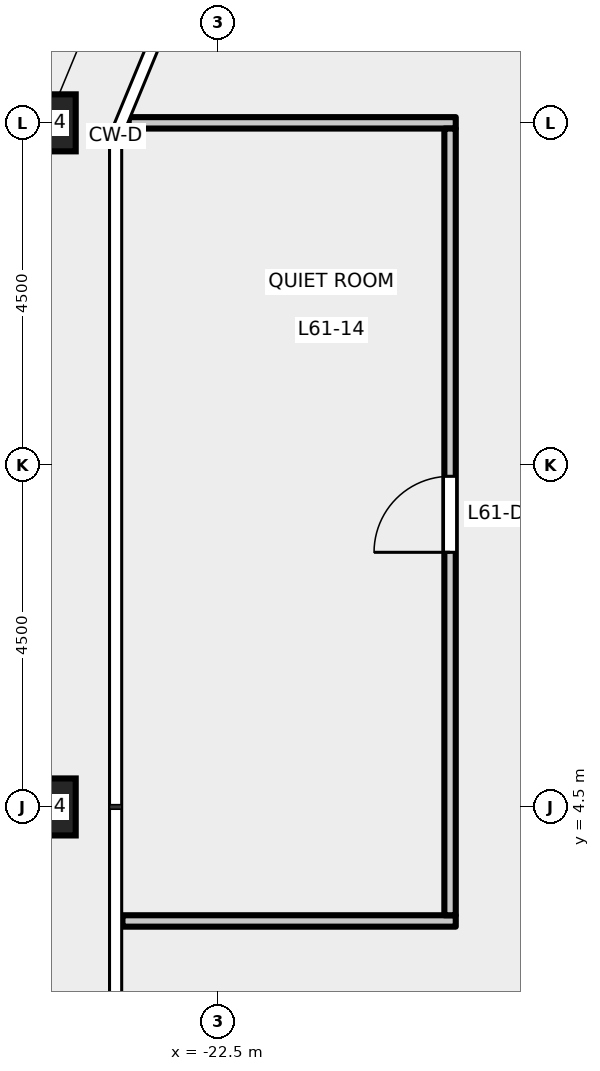
"""IFC4 building model, lengths in metres.
Left out: names, types, materials, properties, quantities, classifications, styles, units other than length and angle.
Written with IfcOpenShell. Run it as: python <this file> out.ifc"""

import sys

from ifc_helpers import new_model, si_unit, direction, frame, frame_2d, origin, origin_2d, place, context, subcontext, project, spatial, rectangle, hollow_rectangle, extrude, element, fill, save


model = new_model("IFC4")
c1 = context("Model", 3, precision=1e-05, world=origin(), true_north=direction((0.0, 1.0)))
c2 = subcontext(c1, "Body", "Model", "MODEL_VIEW")
j1 = project(units=[si_unit("LENGTHUNIT", "METRE"), si_unit("PLANEANGLEUNIT", "RADIAN")], contexts=[c1])
p1 = place(None, origin())
s1 = spatial("IfcSite", under=j1, at=p1, CompositionType="ELEMENT")
p2 = place(p1, origin())
s2 = spatial("IfcBuilding", under=s1, at=p2, CompositionType="ELEMENT")
p3 = place(p2, frame((0.0, 0.0, 284.2)))
s3 = spatial("IfcBuildingStorey", under=s2, at=p3, CompositionType="ELEMENT", Elevation=284.2)
for number, where, z_axis, x_axis in (
    (1, (-24.75, 13.5, -0.2), (0.0, 0.0, 1.0), (1.0, 0.0, 0.0)),
    (2, (-24.75, 4.5, -0.2), (0.0, 0.0, 1.0), (1.0, 0.0, 0.0)),
):
    element("IfcColumn", number, at=place(p3, frame(where, z_axis=z_axis, x_axis=x_axis)), inside=s3, PredefinedType="COLUMN", context=c2, shape_type="SweptSolid", body=[
        extrude(hollow_rectangle(XDim=0.75, YDim=0.75, WallThickness=0.04, at=origin_2d()), origin(), (0.0, 0.0, 1.0), 5.7),
    ])
p4 = place(p3, frame((-23.76, 3.0, 0.0), z_axis=(0.0, 0.0, 1.0), x_axis=(1.0, 0.0, 0.0)))
e3 = element("IfcWall", 3, at=p4, inside=s3, PredefinedType="PARTITIONING", context=c2, shape_type="SweptSolid", body=[
    extrude(rectangle(XDim=4.385, YDim=0.15, at=frame_2d((2.192, 0.0))), origin(), (0.0, 0.0, 1.0), 5.35),
])
p5 = place(p3, frame((-23.678, 13.5, 0.0), z_axis=(0.0, 0.0, 1.0), x_axis=(1.0, 0.0, 0.0)))
e4 = element("IfcWall", 4, at=p5, inside=s3, PredefinedType="PARTITIONING", context=c2, shape_type="SweptSolid", body=[
    extrude(rectangle(XDim=4.303, YDim=0.15, at=frame_2d((2.151, 0.0))), origin(), (0.0, 0.0, 1.0), 5.35),
])
p6 = place(p3, frame((-19.45, 3.075, 0.0), z_axis=(0.0, 0.0, 1.0), x_axis=(0.0, 1.0, 0.0)))
e5 = element("IfcWall", 5, at=p6, inside=s3, PredefinedType="PARTITIONING", context=c2, shape_type="SweptSolid", body=[
    extrude(rectangle(XDim=10.35, YDim=0.15, at=frame_2d((5.175, 0.0))), origin(), (0.0, 0.0, 1.0), 5.35),
])
p7 = place(p6, frame((4.775, 0.0, 0.0)))
e6 = element("IfcOpeningElement", 6, at=p7, cuts=e5, PredefinedType="OPENING", context=c2, shape_type="SweptSolid", body=[
    extrude(rectangle(XDim=1.0, YDim=2.1, at=frame_2d((0.5, 1.05))), frame((0.0, 0.085, 0.0), z_axis=(0.0, -1.0, 0.0), x_axis=(1.0, 0.0, 0.0)), (0.0, 0.0, 1.0), 0.17),
])
p8 = place(p7, origin())
e7 = element("IfcDoor", 7, at=p8, inside=s3, OperationType="SINGLE_SWING_LEFT", PredefinedType="DOOR", context=c2, shape_type="SweptSolid", body=[
    extrude(rectangle(XDim=1.0, YDim=2.1, at=frame_2d((0.5, 1.05))), frame((0.0, 0.025, 0.0), z_axis=(0.0, -1.0, 0.0), x_axis=(1.0, 0.0, 0.0)), (0.0, 0.0, 1.0), 0.05),
])
fill(e6, e7)
save(model, sys.argv[1])
